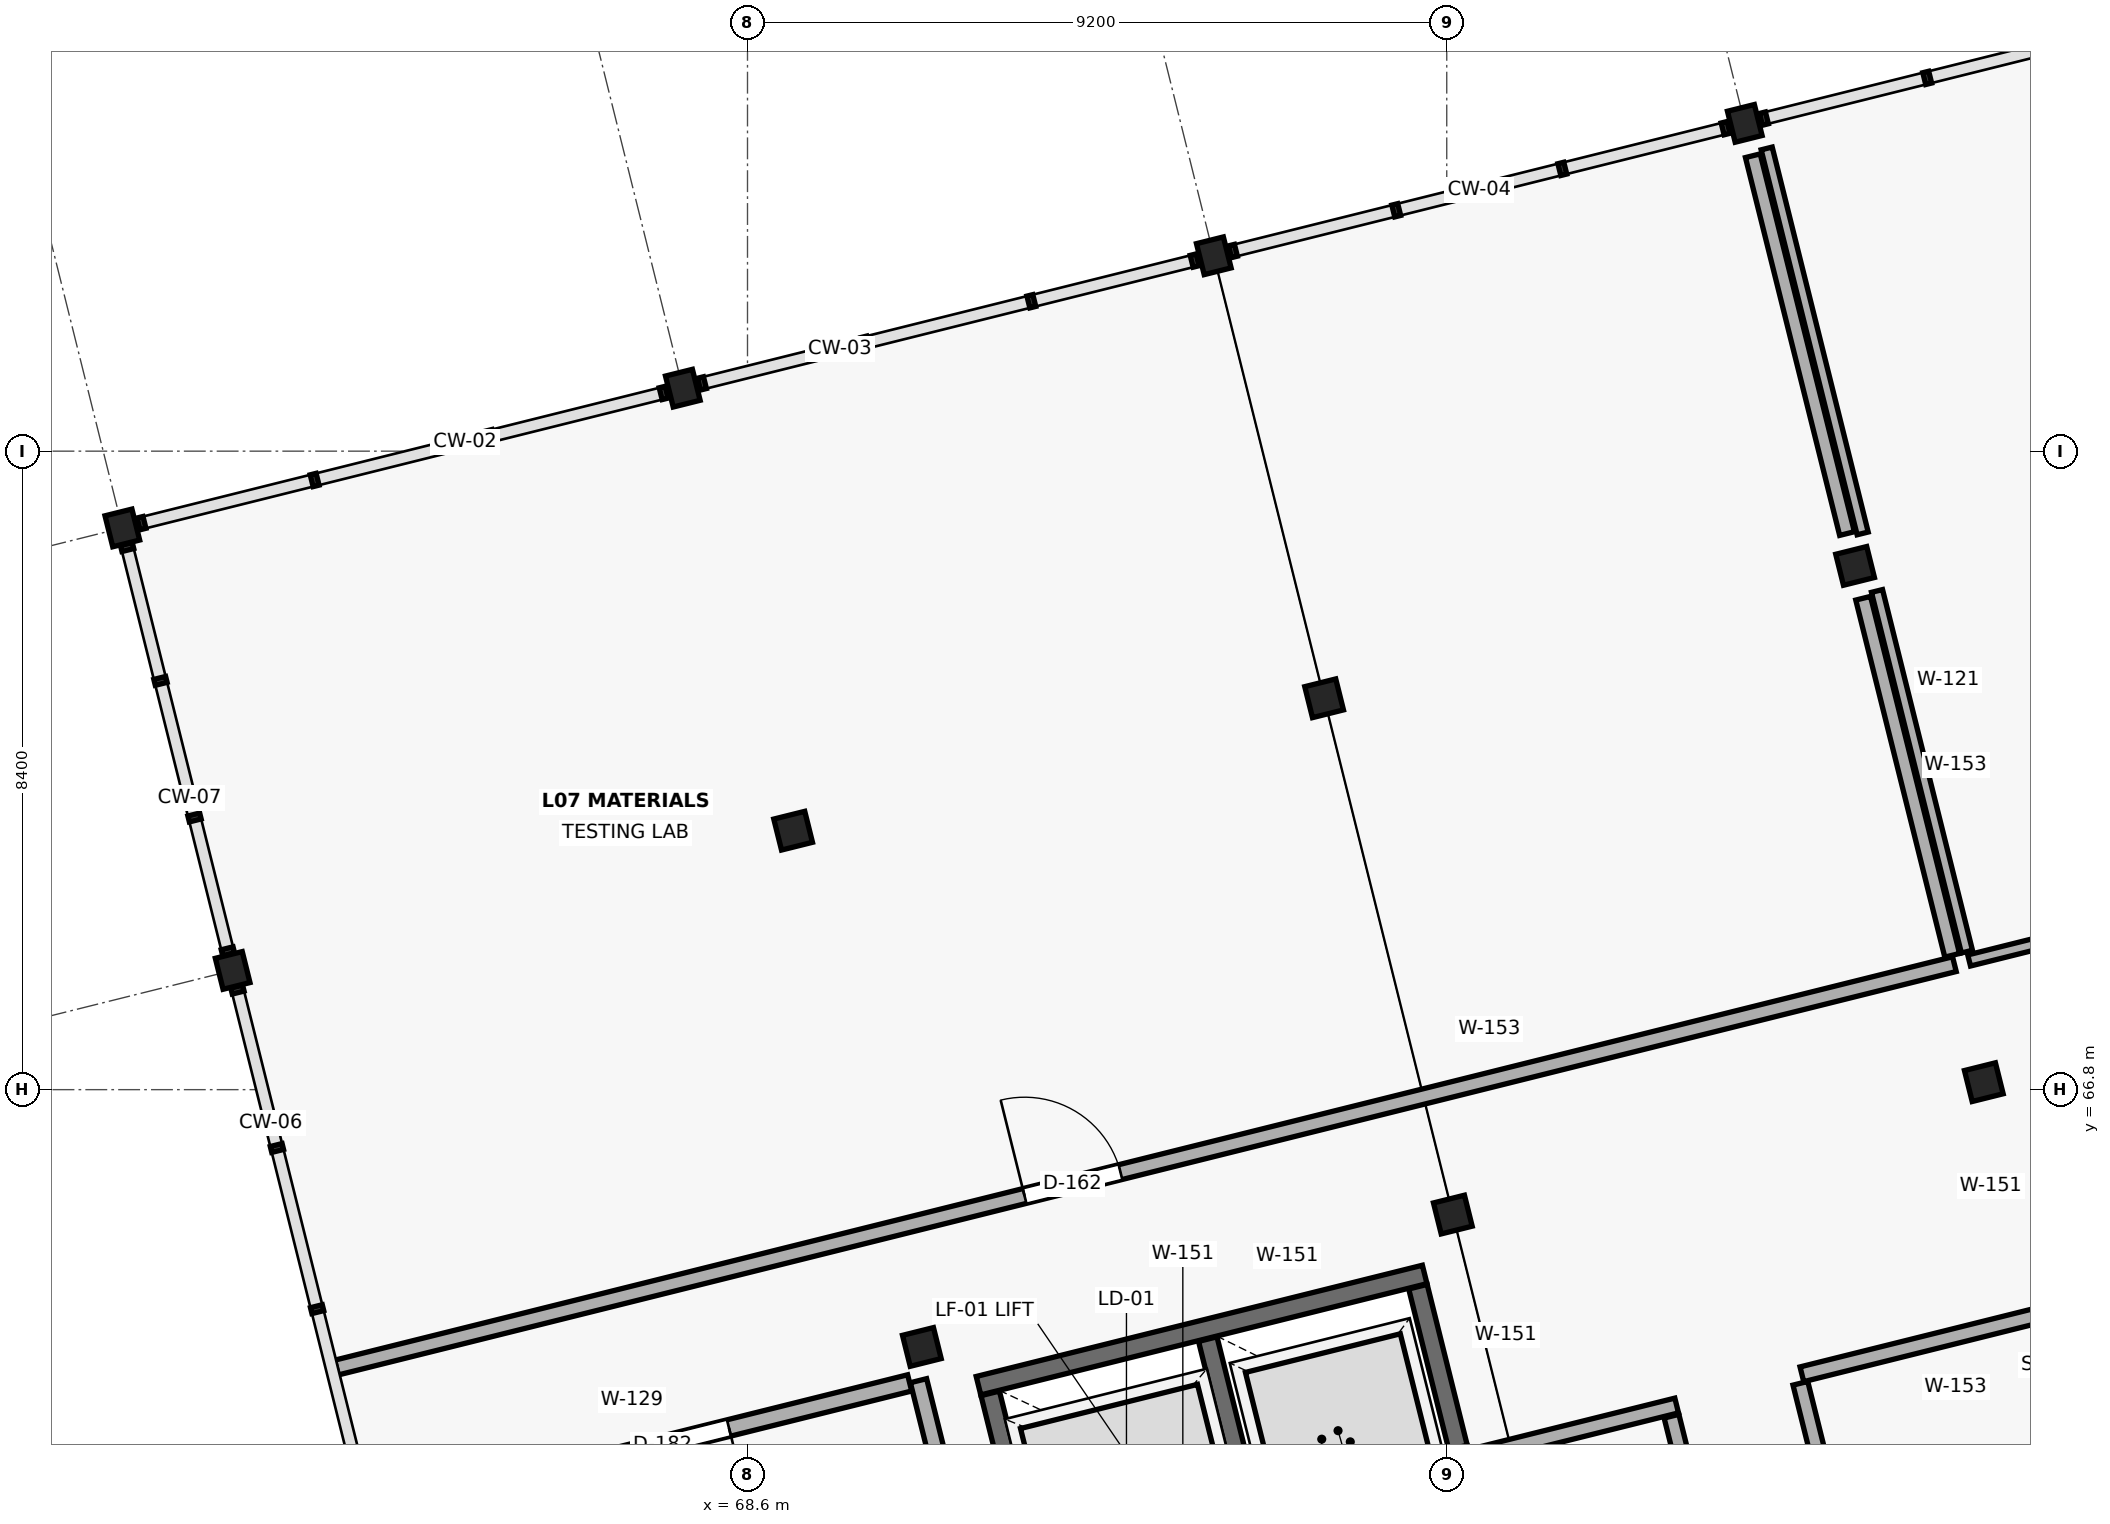
"""IFC4 building model, lengths in metres.
Left out: names, types, materials, properties, quantities, classifications, styles, units other than length and angle.
Written with IfcOpenShell. Run it as: python <this file> out.ifc"""

import sys

from ifc_helpers import new_model, si_unit, direction, frame, frame_2d, origin, origin_2d, place, context, subcontext, project, spatial, rectangle, extrude, element, fill, save


model = new_model("IFC4")
c1 = context("Model", 3, precision=1e-05, world=origin(), true_north=direction((0.0, 1.0)))
c2 = subcontext(c1, "Body", "Model", "MODEL_VIEW")
j1 = project(units=[si_unit("LENGTHUNIT", "METRE"), si_unit("PLANEANGLEUNIT", "RADIAN")], contexts=[c1])
p1 = place(None, origin())
s1 = spatial("IfcSite", under=j1, at=p1, CompositionType="ELEMENT")
p2 = place(p1, origin())
s2 = spatial("IfcBuilding", under=s1, at=p2, CompositionType="ELEMENT")
p3 = place(p2, frame((0.0, 0.0, 30.0)))
s3 = spatial("IfcBuildingStorey", under=s2, at=p3, CompositionType="ELEMENT", Elevation=30.0)
for number, where, z_axis, x_axis in (
    (1, (61.826, 68.368, 0.0), (0.0, 0.0, 1.0), (0.97, 0.242, 0.0)),
    (2, (60.375, 74.19, 0.0), (0.0, 0.0, 1.0), (0.97, 0.242, 0.0)),
):
    element("IfcColumn", number, at=place(p3, frame(where, z_axis=z_axis, x_axis=x_axis)), inside=s3, PredefinedType="COLUMN", context=c2, shape_type="SweptSolid", body=[
        extrude(rectangle(XDim=0.365, YDim=0.42, at=origin_2d()), origin(), (0.0, 0.0, 1.0), 3.9),
    ])
for number, where, z_axis, x_axis in (
    (3, (70.894, 63.415, 0.0), (0.0, 0.0, 1.0), (0.97, 0.242, 0.0)),
    (4, (69.2, 70.207, 0.0), (0.0, 0.0, 1.0), (0.97, 0.242, 0.0)),
):
    element("IfcColumn", number, at=place(p3, frame(where, z_axis=z_axis, x_axis=x_axis)), inside=s3, PredefinedType="COLUMN", context=c2, shape_type="SweptSolid", body=[
        extrude(rectangle(XDim=0.42, YDim=0.42, at=origin_2d()), origin(), (0.0, 0.0, 1.0), 3.9),
    ])
p4 = place(p3, frame((67.749, 76.029, 0.0), z_axis=(0.0, 0.0, 1.0), x_axis=(0.970295726276, 0.2419218956, 0.0)))
e5 = element("IfcColumn", 5, at=p4, inside=s3, PredefinedType="COLUMN", context=c2, shape_type="SweptSolid", body=[
    extrude(rectangle(XDim=0.365, YDim=0.42, at=origin_2d()), origin(), (0.0, 0.0, 1.0), 3.9),
])
for number, where, z_axis, x_axis in (
    (6, (77.88, 65.157, 0.0), (0.0, 0.0, 1.0), (0.97, 0.242, 0.0)),
    (7, (76.187, 71.949, 0.0), (0.0, 0.0, 1.0), (0.97, 0.242, 0.0)),
):
    element("IfcColumn", number, at=place(p3, frame(where, z_axis=z_axis, x_axis=x_axis)), inside=s3, PredefinedType="COLUMN", context=c2, shape_type="SweptSolid", body=[
        extrude(rectangle(XDim=0.42, YDim=0.42, at=origin_2d()), origin(), (0.0, 0.0, 1.0), 3.9),
    ])
p5 = place(p3, frame((74.735, 77.771, 0.0), z_axis=(0.0, 0.0, 1.0), x_axis=(0.970295726276, 0.2419218956, 0.0)))
e8 = element("IfcColumn", 8, at=p5, inside=s3, PredefinedType="COLUMN", context=c2, shape_type="SweptSolid", body=[
    extrude(rectangle(XDim=0.365, YDim=0.42, at=origin_2d()), origin(), (0.0, 0.0, 1.0), 3.9),
])
for number, where, z_axis, x_axis in (
    (9, (84.866, 66.898, 0.0), (0.0, 0.0, 1.0), (0.97, 0.242, 0.0)),
    (10, (83.173, 73.691, 0.0), (0.0, 0.0, 1.0), (0.97, 0.242, 0.0)),
):
    element("IfcColumn", number, at=place(p3, frame(where, z_axis=z_axis, x_axis=x_axis)), inside=s3, PredefinedType="COLUMN", context=c2, shape_type="SweptSolid", body=[
        extrude(rectangle(XDim=0.42, YDim=0.42, at=origin_2d()), origin(), (0.0, 0.0, 1.0), 3.9),
    ])
p6 = place(p3, frame((81.721, 79.512, 0.0), z_axis=(0.0, 0.0, 1.0), x_axis=(0.970295726276, 0.2419218956, 0.0)))
e11 = element("IfcColumn", 11, at=p6, inside=s3, PredefinedType="COLUMN", context=c2, shape_type="SweptSolid", body=[
    extrude(rectangle(XDim=0.365, YDim=0.42, at=origin_2d()), origin(), (0.0, 0.0, 1.0), 3.9),
])
p7 = place(p3, frame((77.51, 64.369, 0.0), z_axis=(0.0, 0.0, 1.0), x_axis=(-0.970296596103, -0.241918406889, 0.0)))
e12 = element("IfcWall", 12, at=p7, inside=s3, PredefinedType="SHEAR", context=c2, shape_type="SweptSolid", body=[
    extrude(rectangle(XDim=6.05, YDim=0.25, at=frame_2d((3.025, 0.0))), origin(), (0.0, 0.0, 1.0), 3.72),
])
for number, where, z_axis, x_axis in (
    (13, (71.793, 62.804, 0.0), (0.0, 0.0, 1.0), (0.242, -0.97, 0.0)),
    (14, (77.948, 62.092, 0.0), (0.0, 0.0, 1.0), (-0.242, 0.97, 0.0)),
    (15, (75.183, 61.403, 0.0), (0.0, 0.0, 1.0), (-0.242, 0.97, 0.0)),
):
    element("IfcWall", number, at=place(p3, frame(where, z_axis=z_axis, x_axis=x_axis)), inside=s3, PredefinedType="SHEAR", context=c2, shape_type="SweptSolid", body=[
        extrude(rectangle(XDim=2.18, YDim=0.25, at=frame_2d((1.09, 0.0))), origin(), (0.0, 0.0, 1.0), 3.72),
    ])
p8 = place(p3, frame((77.992, 61.938, 0.0), z_axis=(0.0, 0.0, 1.0), x_axis=(0.970304586447, 0.241886356621, 0.0)))
e16 = element("IfcWall", 16, at=p8, inside=s3, PredefinedType="STANDARD", context=c2, shape_type="SweptSolid", body=[
    extrude(rectangle(XDim=2.92, YDim=0.2, at=frame_2d((1.46, 0.0))), origin(), (0.0, 0.0, 1.0), 3.72),
])
p9 = place(p3, frame((80.757, 62.504, 0.0), z_axis=(0.0, 0.0, 1.0), x_axis=(0.241885902723, -0.970304699599, 0.0)))
e17 = element("IfcWall", 17, at=p9, inside=s3, PredefinedType="STANDARD", context=c2, shape_type="SweptSolid", body=[
    extrude(rectangle(XDim=3.36, YDim=0.2, at=frame_2d((1.68, 0.0))), origin(), (0.0, 0.0, 1.0), 3.72),
])
p10 = place(p9, frame((0.89, 0.0, 0.0)))
e18 = element("IfcOpeningElement", 18, at=p10, cuts=e17, PredefinedType="OPENING", context=c2, shape_type="SweptSolid", body=[
    extrude(rectangle(XDim=1.1, YDim=2.2, at=frame_2d((0.55, 1.1))), frame((0.0, 0.112, 0.0), z_axis=(0.0, -1.0, 0.0), x_axis=(1.0, 0.0, 0.0)), (0.0, 0.0, 1.0), 0.224),
])
p11 = place(p3, frame((82.453, 62.937, 0.0), z_axis=(0.0, 0.0, 1.0), x_axis=(0.241891967324, -0.970303187743, 0.0)))
e19 = element("IfcWall", 19, at=p11, inside=s3, PredefinedType="STANDARD", context=c2, shape_type="SweptSolid", body=[
    extrude(rectangle(XDim=5.98, YDim=0.2, at=frame_2d((2.99, 0.0))), origin(), (0.0, 0.0, 1.0), 3.72),
])
p12 = place(p3, frame((82.473, 63.055, 0.0), z_axis=(0.0, 0.0, 1.0), x_axis=(0.970284368558, 0.241967444366, 0.0)))
e20 = element("IfcWall", 20, at=p12, inside=s3, PredefinedType="STANDARD", context=c2, shape_type="SweptSolid", body=[
    extrude(rectangle(XDim=3.842, YDim=0.2, at=frame_2d((1.921, 0.0))), origin(), (0.0, 0.0, 1.0), 3.72),
])
p13 = place(p3, frame((72.39, 56.794, 0.0), z_axis=(0.0, 0.0, 1.0), x_axis=(-0.241940051257, 0.970291199382, 0.0)))
e21 = element("IfcWall", 21, at=p13, inside=s3, PredefinedType="PARTITIONING", context=c2, shape_type="SweptSolid", body=[
    extrude(rectangle(XDim=6.366, YDim=0.22, at=frame_2d((3.183, 0.0))), origin(), (0.0, 0.0, 1.0), 3.035),
])
p14 = place(p3, frame((70.733, 62.942, 0.0), z_axis=(0.0, 0.0, 1.0), x_axis=(-0.970295795524, -0.241921617862, 0.0)))
e22 = element("IfcWall", 22, at=p14, inside=s3, PredefinedType="PARTITIONING", context=c2, shape_type="SweptSolid", body=[
    extrude(rectangle(XDim=7.205, YDim=0.22, at=frame_2d((3.602, 0.0))), origin(), (0.0, 0.0, 1.0), 3.72),
])
p15 = place(p14, frame((2.45, 0.0, 0.0)))
e23 = element("IfcOpeningElement", 23, at=p15, cuts=e22, PredefinedType="OPENING", context=c2, shape_type="SweptSolid", body=[
    extrude(rectangle(XDim=1.8, YDim=2.45, at=frame_2d((0.9, 1.225))), frame((0.0, 0.122, 0.0), z_axis=(0.0, -1.0, 0.0), x_axis=(1.0, 0.0, 0.0)), (0.0, 0.0, 1.0), 0.244),
])
p16 = place(p3, frame((63.191, 63.143, 0.0), z_axis=(0.0, 0.0, 1.0), x_axis=(0.970297434182, 0.241915045462, 0.0)))
e24 = element("IfcWall", 24, at=p16, inside=s3, PredefinedType="STANDARD", context=c2, shape_type="SweptSolid", body=[
    extrude(rectangle(XDim=21.94, YDim=0.2, at=frame_2d((10.97, 0.0))), origin(), (0.0, 0.0, 1.0), 3.72),
])
p17 = place(p16, frame((9.332, 0.0, 0.0)))
e25 = element("IfcOpeningElement", 25, at=p17, cuts=e24, PredefinedType="OPENING", context=c2, shape_type="SweptSolid", body=[
    extrude(rectangle(XDim=1.3, YDim=2.25, at=frame_2d((0.65, 1.125))), frame((0.0, 0.112, 0.0), z_axis=(0.0, -1.0, 0.0), x_axis=(1.0, 0.0, 0.0)), (0.0, 0.0, 1.0), 0.224),
])
p18 = place(p3, frame((84.45, 68.567, 0.0), z_axis=(0.0, 0.0, 1.0), x_axis=(-0.241894861771, 0.970302466166, 0.0)))
e26 = element("IfcWall", 26, at=p18, inside=s3, PredefinedType="STANDARD", context=c2, shape_type="SweptSolid", body=[
    extrude(rectangle(XDim=4.842, YDim=0.2, at=frame_2d((2.421, 0.0))), origin(), (0.0, 0.0, 1.0), 3.035),
])
p19 = place(p3, frame((83.067, 74.116, 0.0), z_axis=(0.0, 0.0, 1.0), x_axis=(-0.241941301347, 0.970290887674, 0.0)))
e27 = element("IfcWall", 27, at=p19, inside=s3, PredefinedType="STANDARD", context=c2, shape_type="SweptSolid", body=[
    extrude(rectangle(XDim=5.123, YDim=0.2, at=frame_2d((2.562, 0.0))), origin(), (0.0, 0.0, 1.0), 3.035),
])
p20 = place(p3, frame((84.673, 68.499, 0.0), z_axis=(0.0, 0.0, 1.0), x_axis=(0.970293352795, 0.241931414914, 0.0)))
e28 = element("IfcWall", 28, at=p20, inside=s3, PredefinedType="PARTITIONING", context=c2, shape_type="SweptSolid", body=[
    extrude(rectangle(XDim=11.6, YDim=0.15, at=frame_2d((5.8, 0.0))), origin(), (0.0, 0.0, 1.0), 3.72),
])
p21 = place(p20, frame((4.644, 0.0, 0.0)))
e29 = element("IfcOpeningElement", 29, at=p21, cuts=e28, PredefinedType="OPENING", context=c2, shape_type="SweptSolid", body=[
    extrude(rectangle(XDim=1.45, YDim=2.35, at=frame_2d((0.725, 1.175))), frame((0.0, 0.087, 0.0), z_axis=(0.0, -1.0, 0.0), x_axis=(1.0, 0.0, 0.0)), (0.0, 0.0, 1.0), 0.174),
])
p22 = place(p3, frame((82.01, 79.183, 0.0), z_axis=(0.0, 0.0, 1.0), x_axis=(0.241908270235, -0.970299123359, 0.0)))
e30 = element("IfcWall", 30, at=p22, inside=s3, PredefinedType="PARTITIONING", context=c2, shape_type="SweptSolid", body=[
    extrude(rectangle(XDim=5.22, YDim=0.15, at=frame_2d((2.61, 0.0))), origin(), (0.0, 0.0, 1.0), 3.72),
])
p23 = place(p3, frame((83.461, 73.361, 0.0), z_axis=(0.0, 0.0, 1.0), x_axis=(0.241924759673, -0.970295012178, 0.0)))
e31 = element("IfcWall", 31, at=p23, inside=s3, PredefinedType="PARTITIONING", context=c2, shape_type="SweptSolid", body=[
    extrude(rectangle(XDim=4.89, YDim=0.15, at=frame_2d((2.445, 0.0))), origin(), (0.0, 0.0, 1.0), 3.72),
])
p24 = place(p15, origin())
e32 = element("IfcDoor", 32, at=p24, inside=s3, OperationType="DOUBLE_DOOR_SINGLE_SWING", PredefinedType="DOOR", context=c2, shape_type="SweptSolid", body=[
    extrude(rectangle(XDim=1.8, YDim=2.45, at=frame_2d((0.9, 1.225))), frame((0.0, 0.025, 0.0), z_axis=(0.0, -1.0, 0.0), x_axis=(1.0, 0.0, 0.0)), (0.0, 0.0, 1.0), 0.05),
])
fill(e23, e32)
p25 = place(p17, origin())
e33 = element("IfcDoor", 33, at=p25, inside=s3, OperationType="SINGLE_SWING_LEFT", PredefinedType="DOOR", context=c2, shape_type="SweptSolid", body=[
    extrude(rectangle(XDim=1.3, YDim=2.25, at=frame_2d((0.65, 1.125))), frame((0.0, 0.025, 0.0), z_axis=(0.0, -1.0, 0.0), x_axis=(1.0, 0.0, 0.0)), (0.0, 0.0, 1.0), 0.05),
])
fill(e25, e33)
save(model, sys.argv[1])
